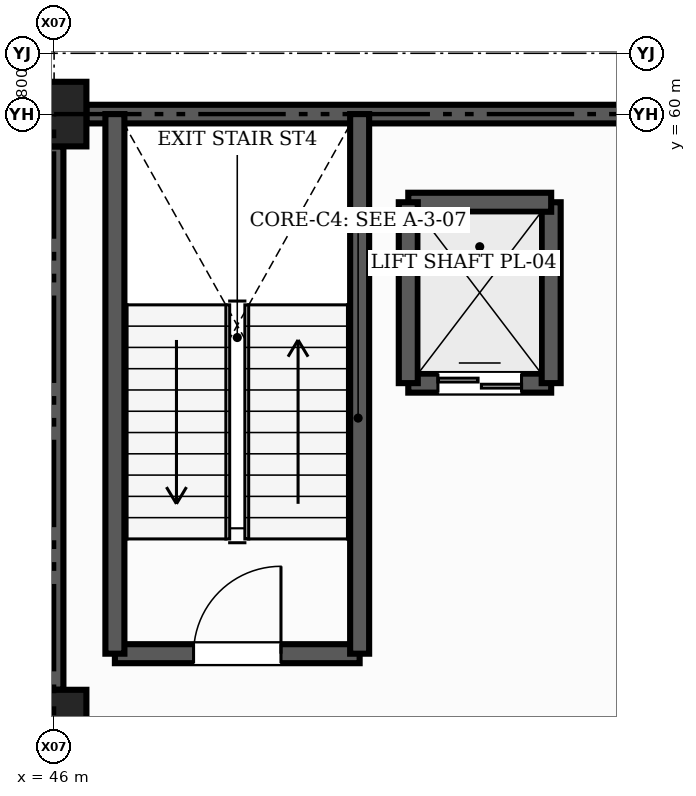
"""IFC4 building model, lengths in metres.
Left out: names, types, materials, properties, quantities, classifications, styles, units other than length and angle.
Written with IfcOpenShell. Run it as: python <this file> out.ifc"""

import sys

from ifc_helpers import new_model, si_unit, direction, frame, frame_2d, origin, origin_2d, place, context, subcontext, project, spatial, rectangle, extrude, element, fill, save


model = new_model("IFC4")
c1 = context("Model", 3, precision=1e-05, world=origin(), true_north=direction((0.0, 1.0)))
c2 = subcontext(c1, "Body", "Model", "MODEL_VIEW")
j1 = project(units=[si_unit("LENGTHUNIT", "METRE"), si_unit("PLANEANGLEUNIT", "RADIAN")], contexts=[c1])
p1 = place(None, origin())
s1 = spatial("IfcSite", under=j1, at=p1, CompositionType="ELEMENT")
p2 = place(p1, origin())
s2 = spatial("IfcBuilding", under=s1, at=p2, CompositionType="ELEMENT")
p3 = place(p2, frame((0.0, 0.0, 9.0)))
s3 = spatial("IfcBuildingStorey", under=s2, at=p3, CompositionType="ELEMENT", Elevation=9.0)
for number, where, z_axis, x_axis in (
    (1, (46.0, 52.0, 0.0), (0.0, 0.0, 1.0), (1.0, 0.0, 0.0)),
    (2, (46.0, 60.0, 0.0), (0.0, 0.0, 1.0), (1.0, 0.0, 0.0)),
):
    element("IfcColumn", number, at=place(p3, frame(where, z_axis=z_axis, x_axis=x_axis)), inside=s3, PredefinedType="COLUMN", context=c2, shape_type="SweptSolid", body=[
        extrude(rectangle(XDim=0.85, YDim=0.85, at=origin_2d()), origin(), (0.0, 0.0, 1.0), 4.5),
    ])
p4 = place(p3, frame((53.725, 60.0, 0.0), z_axis=(0.0, 0.0, 1.0), x_axis=(-1.0, 0.0, 0.0)))
e3 = element("IfcWall", 3, at=p4, inside=s3, PredefinedType="SOLIDWALL", context=c2, shape_type="SweptSolid", body=[
    extrude(rectangle(XDim=7.3, YDim=0.245, at=frame_2d((3.65, 0.0))), origin(), (0.0, 0.0, 1.0), 4.22),
])
p5 = place(p3, frame((46.0, 59.575, 0.0), z_axis=(0.0, 0.0, 1.0), x_axis=(0.0, -1.0, 0.0)))
e4 = element("IfcWall", 4, at=p5, inside=s3, PredefinedType="SOLIDWALL", context=c2, shape_type="SweptSolid", body=[
    extrude(rectangle(XDim=7.15, YDim=0.245, at=frame_2d((3.575, 0.0))), origin(), (0.0, 0.0, 1.0), 3.22),
])
p6 = place(p3, frame((46.8, 52.9, 0.0), z_axis=(0.0, 0.0, 1.0), x_axis=(1.0, 0.0, 0.0)))
e5 = element("IfcWall", 5, at=p6, inside=s3, PredefinedType="SHEAR", context=c2, shape_type="SweptSolid", body=[
    extrude(rectangle(XDim=3.22, YDim=0.25, at=frame_2d((1.61, 0.0))), origin(), (0.0, 0.0, 1.0), 4.5),
])
p7 = place(p6, frame((1.035, 0.0, 0.0)))
e6 = element("IfcOpeningElement", 6, at=p7, cuts=e5, PredefinedType="OPENING", context=c2, shape_type="SweptSolid", body=[
    extrude(rectangle(XDim=1.15, YDim=2.15, at=frame_2d((0.575, 1.075))), frame((0.0, 0.135, 0.0), z_axis=(0.0, -1.0, 0.0), x_axis=(1.0, 0.0, 0.0)), (0.0, 0.0, 1.0), 0.27),
])
for number, where, z_axis, x_axis in (
    (7, (50.02, 52.9, 0.0), (0.0, 0.0, 1.0), (0.0, 1.0, 0.0)),
    (8, (46.8, 60.0, 0.0), (0.0, 0.0, 1.0), (0.0, -1.0, 0.0)),
):
    element("IfcWall", number, at=place(p3, frame(where, z_axis=z_axis, x_axis=x_axis)), inside=s3, PredefinedType="SHEAR", context=c2, shape_type="SweptSolid", body=[
        extrude(rectangle(XDim=7.1, YDim=0.25, at=frame_2d((3.55, 0.0))), origin(), (0.0, 0.0, 1.0), 4.5),
    ])
p8 = place(p3, frame((50.66, 56.46, 0.0), z_axis=(0.0, 0.0, 1.0), x_axis=(1.0, 0.0, 0.0)))
e9 = element("IfcWall", 9, at=p8, inside=s3, PredefinedType="SHEAR", context=c2, shape_type="SweptSolid", body=[
    extrude(rectangle(XDim=1.88, YDim=0.25, at=frame_2d((0.94, 0.0))), origin(), (0.0, 0.0, 1.0), 4.5),
])
p9 = place(p8, frame((0.39, 0.0, 0.0)))
e10 = element("IfcOpeningElement", 10, at=p9, cuts=e9, PredefinedType="OPENING", context=c2, shape_type="SweptSolid", body=[
    extrude(rectangle(XDim=1.1, YDim=2.2, at=frame_2d((0.55, 1.1))), frame((0.0, 0.135, 0.0), z_axis=(0.0, -1.0, 0.0), x_axis=(1.0, 0.0, 0.0)), (0.0, 0.0, 1.0), 0.27),
])
p10 = place(p3, frame((52.54, 56.46, 0.0), z_axis=(0.0, 0.0, 1.0), x_axis=(0.0, 1.0, 0.0)))
e11 = element("IfcWall", 11, at=p10, inside=s3, PredefinedType="SHEAR", context=c2, shape_type="SweptSolid", body=[
    extrude(rectangle(XDim=2.38, YDim=0.25, at=frame_2d((1.19, 0.0))), origin(), (0.0, 0.0, 1.0), 4.5),
])
p11 = place(p3, frame((52.54, 58.84, 0.0), z_axis=(0.0, 0.0, 1.0), x_axis=(-1.0, 0.0, 0.0)))
e12 = element("IfcWall", 12, at=p11, inside=s3, PredefinedType="SHEAR", context=c2, shape_type="SweptSolid", body=[
    extrude(rectangle(XDim=1.88, YDim=0.25, at=frame_2d((0.94, 0.0))), origin(), (0.0, 0.0, 1.0), 4.5),
])
p12 = place(p3, frame((50.66, 58.84, 0.0), z_axis=(0.0, 0.0, 1.0), x_axis=(0.0, -1.0, 0.0)))
e13 = element("IfcWall", 13, at=p12, inside=s3, PredefinedType="SHEAR", context=c2, shape_type="SweptSolid", body=[
    extrude(rectangle(XDim=2.38, YDim=0.25, at=frame_2d((1.19, 0.0))), origin(), (0.0, 0.0, 1.0), 4.5),
])
p13 = place(p7, origin())
e14 = element("IfcDoor", 14, at=p13, inside=s3, OperationType="SINGLE_SWING_RIGHT", PredefinedType="DOOR", context=c2, shape_type="SweptSolid", body=[
    extrude(rectangle(XDim=1.15, YDim=2.15, at=frame_2d((0.575, 1.075))), frame((0.0, 0.025, 0.0), z_axis=(0.0, -1.0, 0.0), x_axis=(1.0, 0.0, 0.0)), (0.0, 0.0, 1.0), 0.05),
])
fill(e6, e14)
p14 = place(p9, origin())
e15 = element("IfcDoor", 15, at=p14, inside=s3, OperationType="DOUBLE_DOOR_SLIDING", PredefinedType="DOOR", context=c2, shape_type="SweptSolid", body=[
    extrude(rectangle(XDim=1.1, YDim=2.2, at=frame_2d((0.55, 1.1))), frame((0.0, 0.025, 0.0), z_axis=(0.0, -1.0, 0.0), x_axis=(1.0, 0.0, 0.0)), (0.0, 0.0, 1.0), 0.05),
])
fill(e10, e15)
save(model, sys.argv[1])
